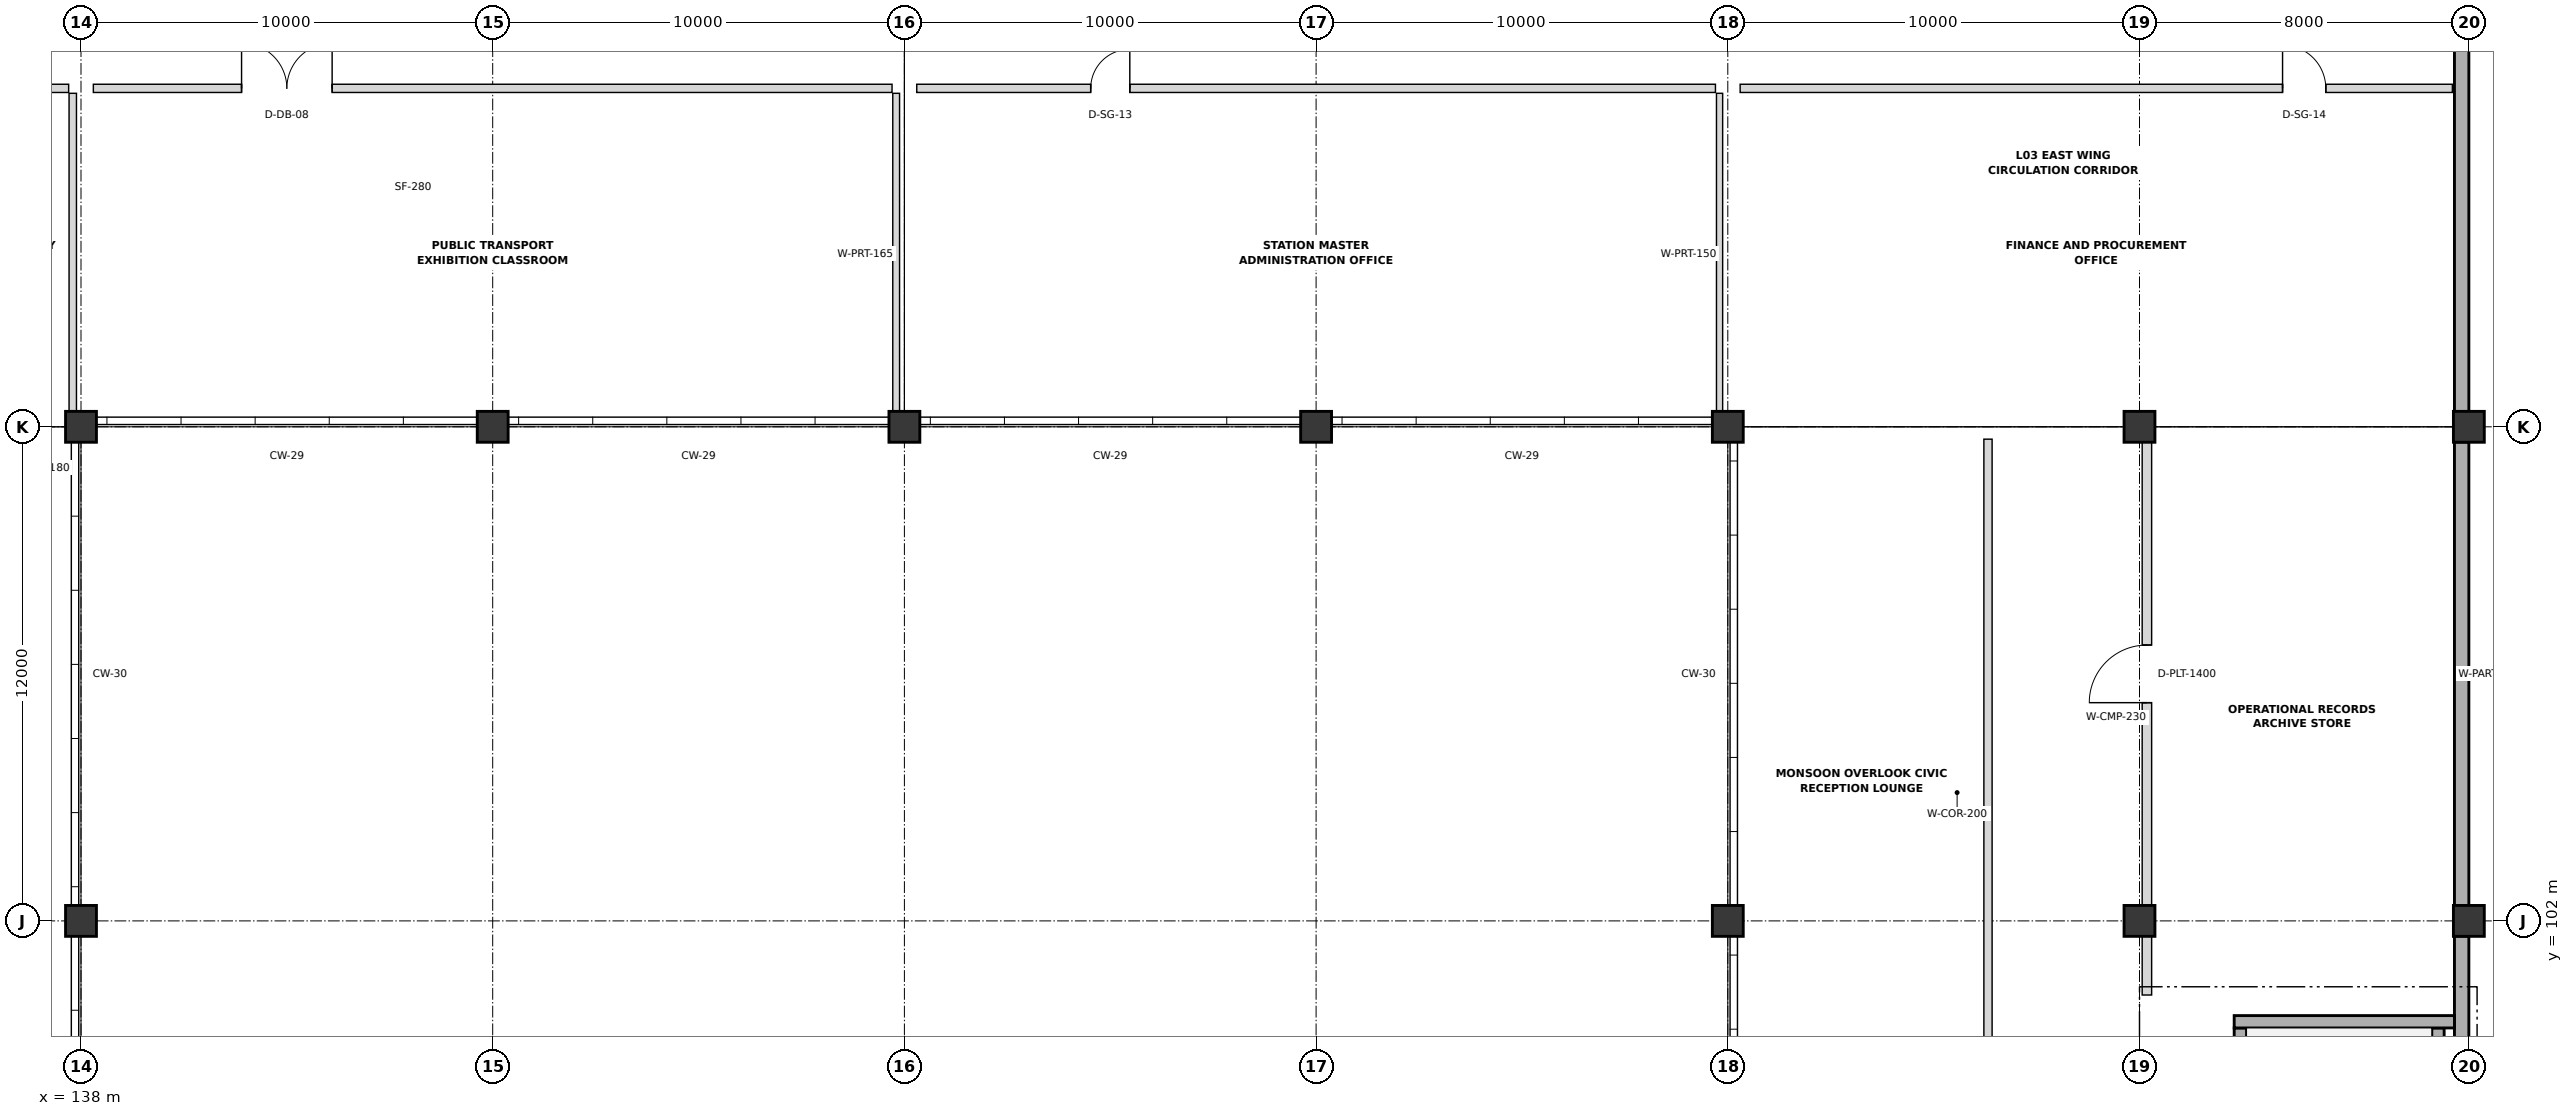
"""IFC4 building model, lengths in metres.
Left out: names, types, materials, properties, quantities, classifications, styles, units other than length and angle.
Written with IfcOpenShell. Run it as: python <this file> out.ifc"""

import sys

from ifc_helpers import new_model, si_unit, direction, frame, frame_2d, origin, origin_2d, place, context, subcontext, project, spatial, rectangle, extrude, element, fill, save


model = new_model("IFC4")
c1 = context("Model", 3, precision=1e-05, world=origin(), true_north=direction((0.0, 1.0)))
c2 = subcontext(c1, "Body", "Model", "MODEL_VIEW")
j1 = project(units=[si_unit("LENGTHUNIT", "METRE"), si_unit("PLANEANGLEUNIT", "RADIAN")], contexts=[c1])
p1 = place(None, origin())
s1 = spatial("IfcSite", under=j1, at=p1, CompositionType="ELEMENT")
p2 = place(p1, origin())
s2 = spatial("IfcBuilding", under=s1, at=p2, CompositionType="ELEMENT")
p3 = place(p2, frame((0.0, 0.0, 14.4)))
s3 = spatial("IfcBuildingStorey", under=s2, at=p3, CompositionType="ELEMENT", Elevation=14.4)
for number, where, z_axis, x_axis in (
    (1, (138.0, 102.0, 0.0), (0.0, 0.0, 1.0), (1.0, 0.0, 0.0)),
    (2, (138.0, 114.0, 0.0), (0.0, 0.0, 1.0), (1.0, 0.0, 0.0)),
    (3, (148.0, 114.0, 0.0), (0.0, 0.0, 1.0), (1.0, 0.0, 0.0)),
    (4, (158.0, 114.0, 0.0), (0.0, 0.0, 1.0), (1.0, 0.0, 0.0)),
    (5, (168.0, 114.0, 0.0), (0.0, 0.0, 1.0), (1.0, 0.0, 0.0)),
    (6, (178.0, 102.0, 0.0), (0.0, 0.0, 1.0), (1.0, 0.0, 0.0)),
    (7, (178.0, 114.0, 0.0), (0.0, 0.0, 1.0), (1.0, 0.0, 0.0)),
    (8, (188.0, 102.0, 0.0), (0.0, 0.0, 1.0), (1.0, 0.0, 0.0)),
    (9, (188.0, 114.0, 0.0), (0.0, 0.0, 1.0), (1.0, 0.0, 0.0)),
    (10, (196.0, 102.0, 0.0), (0.0, 0.0, 1.0), (1.0, 0.0, 0.0)),
    (11, (196.0, 114.0, 0.0), (0.0, 0.0, 1.0), (1.0, 0.0, 0.0)),
):
    element("IfcColumn", number, at=place(p3, frame(where, z_axis=z_axis, x_axis=x_axis)), inside=s3, PredefinedType="COLUMN", context=c2, shape_type="SweptSolid", body=[
        extrude(rectangle(XDim=0.75, YDim=0.75, at=origin_2d()), origin(), (0.0, 0.0, 1.0), 4.2),
    ])
for number, where, z_axis, x_axis in (
    (12, (195.825, 101.63, 0.0), (0.0, 0.0, 1.0), (0.0, -1.0, 0.0)),
    (13, (195.825, 113.63, 0.0), (0.0, 0.0, 1.0), (0.0, -1.0, 0.0)),
    (14, (195.825, 125.63, 0.0), (0.0, 0.0, 1.0), (0.0, -1.0, 0.0)),
):
    element("IfcWall", number, at=place(p3, frame(where, z_axis=z_axis, x_axis=x_axis)), inside=s3, PredefinedType="SOLIDWALL", context=c2, shape_type="SweptSolid", body=[
        extrude(rectangle(XDim=11.26, YDim=0.35, at=frame_2d((5.63, 0.0))), origin(), (0.0, 0.0, 1.0), 4.2),
    ])
for number, where, z_axis, x_axis in (
    (15, (190.45, 90.8, 0.0), (0.0, 0.0, 1.0), (0.0, 1.0, 0.0)),
    (16, (195.25, 99.4, 0.0), (0.0, 0.0, 1.0), (0.0, -1.0, 0.0)),
):
    element("IfcWall", number, at=place(p3, frame(where, z_axis=z_axis, x_axis=x_axis)), inside=s3, PredefinedType="SHEAR", context=c2, shape_type="SweptSolid", body=[
        extrude(rectangle(XDim=8.6, YDim=0.3, at=frame_2d((4.3, 0.0))), origin(), (0.0, 0.0, 1.0), 4.2),
    ])
p4 = place(p3, frame((190.3, 99.55, 0.0), z_axis=(0.0, 0.0, 1.0), x_axis=(1.0, 0.0, 0.0)))
e17 = element("IfcWall", 17, at=p4, inside=s3, PredefinedType="SHEAR", context=c2, shape_type="SweptSolid", body=[
    extrude(rectangle(XDim=5.35, YDim=0.3, at=frame_2d((2.675, 0.0))), origin(), (0.0, 0.0, 1.0), 4.2),
])
p5 = place(p3, frame((118.4, 122.22, 0.0), z_axis=(0.0, 0.0, 1.0), x_axis=(1.0, 0.0, 0.0)))
e18 = element("IfcWall", 18, at=p5, inside=s3, PredefinedType="PARTITIONING", context=c2, shape_type="SweptSolid", body=[
    extrude(rectangle(XDim=19.3, YDim=0.2, at=frame_2d((9.65, 0.0))), origin(), (0.0, 0.0, 1.0), 3.178),
])
p6 = place(p5, frame((3.55, 0.0, 0.0)))
e19 = element("IfcOpeningElement", 19, at=p6, cuts=e18, PredefinedType="OPENING", context=c2, shape_type="SweptSolid", body=[
    extrude(rectangle(XDim=2.1, YDim=2.3, at=frame_2d((1.05, 1.15))), frame((0.0, 0.11, 0.0), z_axis=(0.0, -1.0, 0.0), x_axis=(1.0, 0.0, 0.0)), (0.0, 0.0, 1.0), 0.22),
])
p7 = place(p3, frame((137.8, 114.3, 0.0), z_axis=(0.0, 0.0, 1.0), x_axis=(0.0, 1.0, 0.0)))
e20 = element("IfcWall", 20, at=p7, inside=s3, PredefinedType="PARTITIONING", context=c2, shape_type="SweptSolid", body=[
    extrude(rectangle(XDim=7.8, YDim=0.18, at=frame_2d((3.9, 0.0))), origin(), (0.0, 0.0, 1.0), 3.078),
])
p8 = place(p3, frame((138.3, 122.22, 0.0), z_axis=(0.0, 0.0, 1.0), x_axis=(1.0, 0.0, 0.0)))
e21 = element("IfcWall", 21, at=p8, inside=s3, PredefinedType="PARTITIONING", context=c2, shape_type="SweptSolid", body=[
    extrude(rectangle(XDim=19.4, YDim=0.2, at=frame_2d((9.7, 0.0))), origin(), (0.0, 0.0, 1.0), 3.178),
])
p9 = place(p8, frame((3.6, 0.0, 0.0)))
e22 = element("IfcOpeningElement", 22, at=p9, cuts=e21, PredefinedType="OPENING", context=c2, shape_type="SweptSolid", body=[
    extrude(rectangle(XDim=2.2, YDim=2.3, at=frame_2d((1.1, 1.15))), frame((0.0, 0.11, 0.0), z_axis=(0.0, -1.0, 0.0), x_axis=(1.0, 0.0, 0.0)), (0.0, 0.0, 1.0), 0.22),
])
p10 = place(p3, frame((157.8, 114.3, 0.0), z_axis=(0.0, 0.0, 1.0), x_axis=(0.0, 1.0, 0.0)))
e23 = element("IfcWall", 23, at=p10, inside=s3, PredefinedType="PARTITIONING", context=c2, shape_type="SweptSolid", body=[
    extrude(rectangle(XDim=7.8, YDim=0.165, at=frame_2d((3.9, 0.0))), origin(), (0.0, 0.0, 1.0), 3.078),
])
p11 = place(p3, frame((158.3, 122.22, 0.0), z_axis=(0.0, 0.0, 1.0), x_axis=(1.0, 0.0, 0.0)))
e24 = element("IfcWall", 24, at=p11, inside=s3, PredefinedType="PARTITIONING", context=c2, shape_type="SweptSolid", body=[
    extrude(rectangle(XDim=19.4, YDim=0.2, at=frame_2d((9.7, 0.0))), origin(), (0.0, 0.0, 1.0), 3.178),
])
p12 = place(p11, frame((4.225, 0.0, 0.0)))
e25 = element("IfcOpeningElement", 25, at=p12, cuts=e24, PredefinedType="OPENING", context=c2, shape_type="SweptSolid", body=[
    extrude(rectangle(XDim=0.95, YDim=2.3, at=frame_2d((0.475, 1.15))), frame((0.0, 0.11, 0.0), z_axis=(0.0, -1.0, 0.0), x_axis=(1.0, 0.0, 0.0)), (0.0, 0.0, 1.0), 0.22),
])
p13 = place(p3, frame((177.8, 114.3, 0.0), z_axis=(0.0, 0.0, 1.0), x_axis=(0.0, 1.0, 0.0)))
e26 = element("IfcWall", 26, at=p13, inside=s3, PredefinedType="PARTITIONING", context=c2, shape_type="SweptSolid", body=[
    extrude(rectangle(XDim=7.8, YDim=0.15, at=frame_2d((3.9, 0.0))), origin(), (0.0, 0.0, 1.0), 3.078),
])
p14 = place(p3, frame((178.3, 122.22, 0.0), z_axis=(0.0, 0.0, 1.0), x_axis=(1.0, 0.0, 0.0)))
e27 = element("IfcWall", 27, at=p14, inside=s3, PredefinedType="PARTITIONING", context=c2, shape_type="SweptSolid", body=[
    extrude(rectangle(XDim=17.3, YDim=0.2, at=frame_2d((8.65, 0.0))), origin(), (0.0, 0.0, 1.0), 3.178),
])
p15 = place(p14, frame((13.175, 0.0, 0.0)))
e28 = element("IfcOpeningElement", 28, at=p15, cuts=e27, PredefinedType="OPENING", context=c2, shape_type="SweptSolid", body=[
    extrude(rectangle(XDim=1.05, YDim=2.3, at=frame_2d((0.525, 1.15))), frame((0.0, 0.11, 0.0), z_axis=(0.0, -1.0, 0.0), x_axis=(1.0, 0.0, 0.0)), (0.0, 0.0, 1.0), 0.22),
])
p16 = place(p3, frame((184.32, 78.3, 0.0), z_axis=(0.0, 0.0, 1.0), x_axis=(0.0, 1.0, 0.0)))
e29 = element("IfcWall", 29, at=p16, inside=s3, PredefinedType="PARTITIONING", context=c2, shape_type="SweptSolid", body=[
    extrude(rectangle(XDim=35.4, YDim=0.2, at=frame_2d((17.7, 0.0))), origin(), (0.0, 0.0, 1.0), 3.078),
])
p17 = place(p16, frame((17.175, 0.0, 0.0)))
e30 = element("IfcOpeningElement", 30, at=p17, cuts=e29, PredefinedType="OPENING", context=c2, shape_type="SweptSolid", body=[
    extrude(rectangle(XDim=1.05, YDim=2.1, at=frame_2d((0.525, 1.05))), frame((0.0, 0.11, 0.0), z_axis=(0.0, -1.0, 0.0), x_axis=(1.0, 0.0, 0.0)), (0.0, 0.0, 1.0), 0.22),
])
p18 = place(p3, frame((188.18, 100.2, 0.0), z_axis=(0.0, 0.0, 1.0), x_axis=(0.0, 1.0, 0.0)))
e31 = element("IfcWall", 31, at=p18, inside=s3, PredefinedType="PARTITIONING", context=c2, shape_type="SweptSolid", body=[
    extrude(rectangle(XDim=13.5, YDim=0.23, at=frame_2d((6.75, 0.0))), origin(), (0.0, 0.0, 1.0), 3.078),
])
p19 = place(p18, frame((7.1, 0.0, 0.0)))
e32 = element("IfcOpeningElement", 32, at=p19, cuts=e31, PredefinedType="OPENING", context=c2, shape_type="SweptSolid", body=[
    extrude(rectangle(XDim=1.4, YDim=2.2, at=frame_2d((0.7, 1.1))), frame((0.0, 0.125, 0.0), z_axis=(0.0, -1.0, 0.0), x_axis=(1.0, 0.0, 0.0)), (0.0, 0.0, 1.0), 0.25),
])
p20 = place(p9, origin())
e33 = element("IfcDoor", 33, at=p20, inside=s3, OperationType="DOUBLE_DOOR_SINGLE_SWING", PredefinedType="DOOR", context=c2, shape_type="SweptSolid", body=[
    extrude(rectangle(XDim=2.2, YDim=2.3, at=frame_2d((1.1, 1.15))), frame((0.0, 0.025, 0.0), z_axis=(0.0, -1.0, 0.0), x_axis=(1.0, 0.0, 0.0)), (0.0, 0.0, 1.0), 0.05),
])
fill(e22, e33)
p21 = place(p12, origin())
e34 = element("IfcDoor", 34, at=p21, inside=s3, OperationType="SINGLE_SWING_RIGHT", PredefinedType="DOOR", context=c2, shape_type="SweptSolid", body=[
    extrude(rectangle(XDim=0.95, YDim=2.3, at=frame_2d((0.475, 1.15))), frame((0.0, 0.025, 0.0), z_axis=(0.0, -1.0, 0.0), x_axis=(1.0, 0.0, 0.0)), (0.0, 0.0, 1.0), 0.05),
])
fill(e25, e34)
p22 = place(p15, origin())
e35 = element("IfcDoor", 35, at=p22, inside=s3, OperationType="SINGLE_SWING_LEFT", PredefinedType="DOOR", context=c2, shape_type="SweptSolid", body=[
    extrude(rectangle(XDim=1.05, YDim=2.3, at=frame_2d((0.525, 1.15))), frame((0.0, 0.025, 0.0), z_axis=(0.0, -1.0, 0.0), x_axis=(1.0, 0.0, 0.0)), (0.0, 0.0, 1.0), 0.05),
])
fill(e28, e35)
p23 = place(p19, origin())
e36 = element("IfcDoor", 36, at=p23, inside=s3, OperationType="SINGLE_SWING_LEFT", PredefinedType="DOOR", context=c2, shape_type="SweptSolid", body=[
    extrude(rectangle(XDim=1.4, YDim=2.2, at=frame_2d((0.7, 1.1))), frame((0.0, 0.025, 0.0), z_axis=(0.0, -1.0, 0.0), x_axis=(1.0, 0.0, 0.0)), (0.0, 0.0, 1.0), 0.05),
])
fill(e32, e36)
save(model, sys.argv[1])
